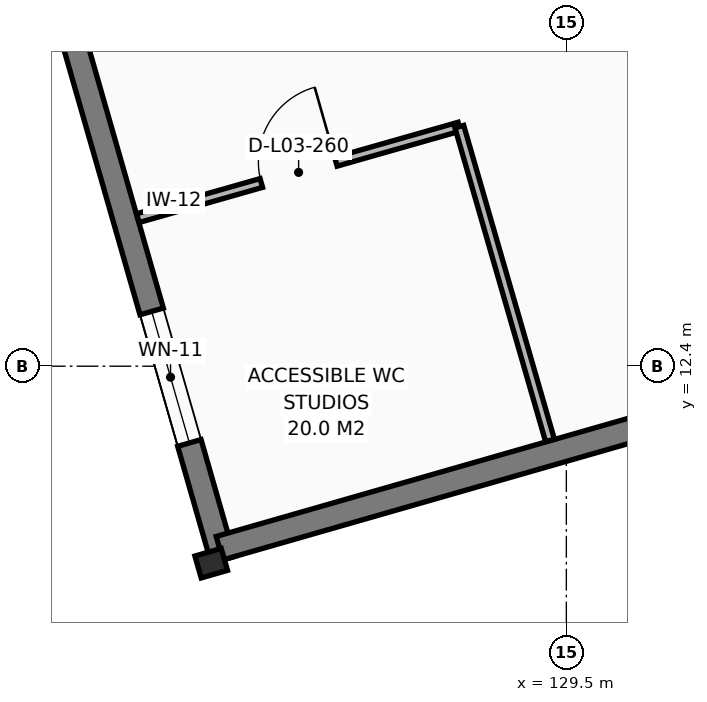
"""IFC4 building model, lengths in metres.
Left out: names, types, materials, properties, quantities, classifications, styles, units other than length and angle.
Written with IfcOpenShell. Run it as: python <this file> out.ifc"""

import sys

from ifc_helpers import new_model, si_unit, direction, frame, frame_2d, origin, origin_2d, place, context, subcontext, project, spatial, rectangle, i_section, extrude, element, fill, save


model = new_model("IFC4")
c1 = context("Model", 3, precision=1e-05, world=origin(), true_north=direction((0.0, 1.0)))
c2 = subcontext(c1, "Body", "Model", "MODEL_VIEW")
j1 = project(units=[si_unit("LENGTHUNIT", "METRE"), si_unit("PLANEANGLEUNIT", "RADIAN")], contexts=[c1])
p1 = place(None, origin())
s1 = spatial("IfcSite", under=j1, at=p1, CompositionType="ELEMENT")
p2 = place(p1, origin())
s2 = spatial("IfcBuilding", under=s1, at=p2, CompositionType="ELEMENT")
p3 = place(p2, frame((0.0, 0.0, 13.68)))
s3 = spatial("IfcBuildingStorey", under=s2, at=p3, CompositionType="ELEMENT", Elevation=13.68)
p4 = place(p3, frame((124.827, 9.808, 0.0), z_axis=(0.0, 0.0, 1.0), x_axis=(0.961261695938, 0.275637355817, 0.0)))
e1 = element("IfcColumn", 1, at=p4, inside=s3, PredefinedType="COLUMN", context=c2, shape_type="SweptSolid", body=[
    extrude(i_section(OverallWidth=0.3, OverallDepth=0.36, WebThickness=0.012, FlangeThickness=0.022, FilletRadius=0.027, at=origin_2d()), origin(), (0.0, 0.0, 1.0), 3.96),
])
p5 = place(p3, frame((124.981, 9.852, 0.0), z_axis=(0.0, 0.0, 1.0), x_axis=(-0.275633622707, 0.961262766383, 0.0)))
e2 = element("IfcWall", 2, at=p5, inside=s3, PredefinedType="SOLIDWALL", context=c2, shape_type="SweptSolid", body=[
    extrude(rectangle(XDim=26.04, YDim=0.32, at=frame_2d((13.02, 0.0))), origin(), (0.0, 0.0, 1.0), 3.72),
])
p6 = place(p5, frame((1.6, 0.0, 0.85)))
e3 = element("IfcOpeningElement", 3, at=p6, cuts=e2, PredefinedType="OPENING", context=c2, shape_type="SweptSolid", body=[
    extrude(rectangle(XDim=1.8, YDim=1.7, at=frame_2d((0.9, 0.85))), frame((0.0, 0.17, 0.0), z_axis=(0.0, -1.0, 0.0), x_axis=(1.0, 0.0, 0.0)), (0.0, 0.0, 1.0), 0.34),
])
p7 = place(p5, frame((13.02, 0.0, 0.85)))
e4 = element("IfcOpeningElement", 4, at=p7, cuts=e2, PredefinedType="OPENING", context=c2, shape_type="SweptSolid", body=[
    extrude(rectangle(XDim=2.0, YDim=1.3, at=frame_2d((1.0, 0.65))), frame((0.0, 0.17, 0.0), z_axis=(0.0, -1.0, 0.0), x_axis=(1.0, 0.0, 0.0)), (0.0, 0.0, 1.0), 0.34),
])
p8 = place(p5, frame((18.73, 0.0, 0.85)))
e5 = element("IfcOpeningElement", 5, at=p8, cuts=e2, PredefinedType="OPENING", context=c2, shape_type="SweptSolid", body=[
    extrude(rectangle(XDim=1.2, YDim=1.4, at=frame_2d((0.6, 0.7))), frame((0.0, 0.17, 0.0), z_axis=(0.0, -1.0, 0.0), x_axis=(1.0, 0.0, 0.0)), (0.0, 0.0, 1.0), 0.34),
])
p9 = place(p3, frame((149.103, 16.936, 0.0), z_axis=(0.0, 0.0, 1.0), x_axis=(-0.961262224101, -0.275635513888, 0.0)))
e6 = element("IfcWall", 6, at=p9, inside=s3, PredefinedType="SOLIDWALL", context=c2, shape_type="SweptSolid", body=[
    extrude(rectangle(XDim=25.14, YDim=0.32, at=frame_2d((12.57, 0.0))), origin(), (0.0, 0.0, 1.0), 3.72),
])
p10 = place(p9, frame((1.6, 0.0, 0.85)))
e7 = element("IfcOpeningElement", 7, at=p10, cuts=e6, PredefinedType="OPENING", context=c2, shape_type="SweptSolid", body=[
    extrude(rectangle(XDim=1.3, YDim=1.6, at=frame_2d((0.65, 0.8))), frame((0.0, 0.17, 0.0), z_axis=(0.0, -1.0, 0.0), x_axis=(1.0, 0.0, 0.0)), (0.0, 0.0, 1.0), 0.34),
])
p11 = place(p9, frame((8.913, 0.0, 0.85)))
e8 = element("IfcOpeningElement", 8, at=p11, cuts=e6, PredefinedType="OPENING", context=c2, shape_type="SweptSolid", body=[
    extrude(rectangle(XDim=1.6, YDim=1.6, at=frame_2d((0.8, 0.8))), frame((0.0, 0.17, 0.0), z_axis=(0.0, -1.0, 0.0), x_axis=(1.0, 0.0, 0.0)), (0.0, 0.0, 1.0), 0.34),
])
p12 = place(p9, frame((16.227, 0.0, 0.85)))
e9 = element("IfcOpeningElement", 9, at=p12, cuts=e6, PredefinedType="OPENING", context=c2, shape_type="SweptSolid", body=[
    extrude(rectangle(XDim=1.9, YDim=1.6, at=frame_2d((0.95, 0.8))), frame((0.0, 0.17, 0.0), z_axis=(0.0, -1.0, 0.0), x_axis=(1.0, 0.0, 0.0)), (0.0, 0.0, 1.0), 0.34),
])
p13 = place(p3, frame((123.863, 14.348, 0.0), z_axis=(0.0, 0.0, 1.0), x_axis=(0.961808373757, 0.273723678498, 0.0)))
e10 = element("IfcWall", 10, at=p13, inside=s3, PredefinedType="PARTITIONING", context=c2, shape_type="SweptSolid", body=[
    extrude(rectangle(XDim=4.397, YDim=0.12, at=frame_2d((2.199, 0.0))), origin(), (0.0, 0.0, 1.0), 3.4),
])
p14 = place(p13, frame((1.689, 0.0, 0.0)))
e11 = element("IfcOpeningElement", 11, at=p14, cuts=e10, PredefinedType="OPENING", context=c2, shape_type="SweptSolid", body=[
    extrude(rectangle(XDim=1.02, YDim=2.12, at=frame_2d((0.51, 1.06))), frame((0.0, 0.07, 0.0), z_axis=(0.0, -1.0, 0.0), x_axis=(1.0, 0.0, 0.0)), (0.0, 0.0, 1.0), 0.14),
])
p15 = place(p3, frame((128.092, 15.552, 0.0), z_axis=(0.0, 0.0, 1.0), x_axis=(0.277586262632, -0.960700716559, 0.0)))
e12 = element("IfcWall", 12, at=p15, inside=s3, PredefinedType="PARTITIONING", context=c2, shape_type="SweptSolid", body=[
    extrude(rectangle(XDim=4.297, YDim=0.12, at=frame_2d((2.149, 0.0))), origin(), (0.0, 0.0, 1.0), 3.71),
])
p16 = place(p6, origin())
e13 = element("IfcWindow", 13, at=p16, inside=s3, PartitioningType="SINGLE_PANEL", PredefinedType="WINDOW", context=c2, shape_type="SweptSolid", body=[
    extrude(rectangle(XDim=1.8, YDim=1.7, at=frame_2d((0.9, 0.85))), frame((0.0, 0.03, 0.0), z_axis=(0.0, -1.0, 0.0), x_axis=(1.0, 0.0, 0.0)), (0.0, 0.0, 1.0), 0.06),
])
fill(e3, e13)
p17 = place(p14, origin())
e14 = element("IfcDoor", 14, at=p17, inside=s3, OperationType="SINGLE_SWING_RIGHT", PredefinedType="DOOR", context=c2, shape_type="SweptSolid", body=[
    extrude(rectangle(XDim=1.02, YDim=2.12, at=frame_2d((0.51, 1.06))), frame((0.0, 0.025, 0.0), z_axis=(0.0, -1.0, 0.0), x_axis=(1.0, 0.0, 0.0)), (0.0, 0.0, 1.0), 0.05),
])
fill(e11, e14)
save(model, sys.argv[1])
